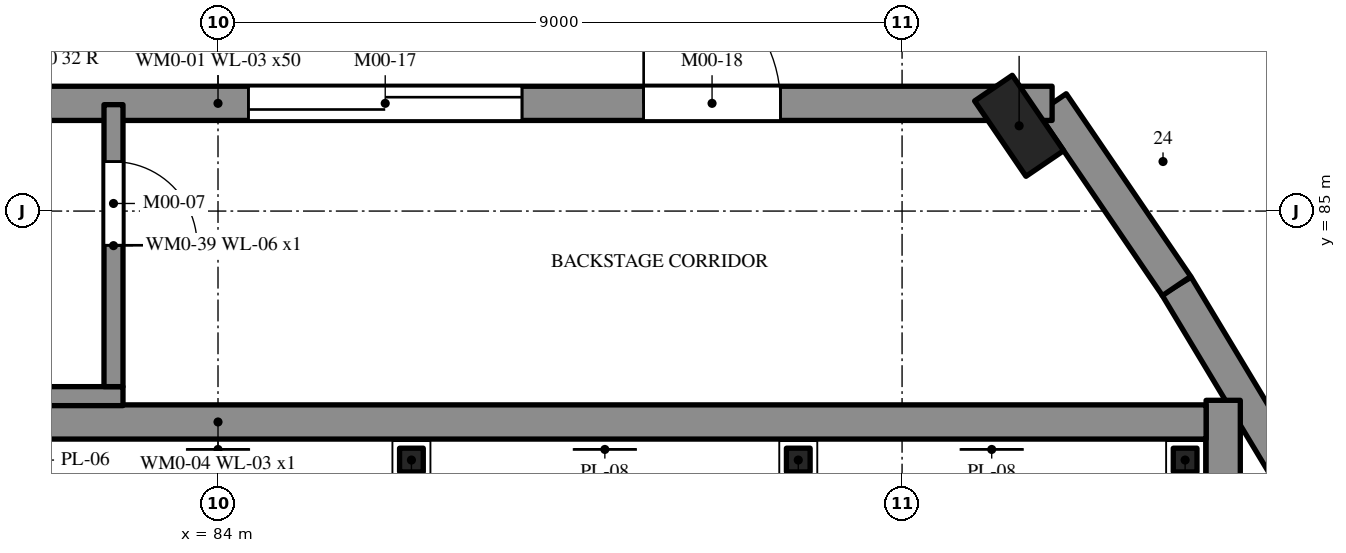
"""IFC4 building model, lengths in metres.
Left out: names, types, materials, properties, quantities, classifications, styles, units other than length and angle.
Written with IfcOpenShell. Run it as: python <this file> out.ifc"""

import sys

from ifc_helpers import new_model, si_unit, direction, frame, frame_2d, origin, origin_2d, place, context, subcontext, project, spatial, rectangle, i_section, extrude, element, fill, save


model = new_model("IFC4")
c1 = context("Model", 3, precision=1e-05, world=origin(), true_north=direction((0.0, 1.0)))
c2 = subcontext(c1, "Body", "Model", "MODEL_VIEW")
j1 = project(units=[si_unit("LENGTHUNIT", "METRE"), si_unit("PLANEANGLEUNIT", "RADIAN")], contexts=[c1])
p1 = place(None, origin())
s1 = spatial("IfcSite", under=j1, at=p1, CompositionType="ELEMENT")
p2 = place(p1, origin())
s2 = spatial("IfcBuilding", under=s1, at=p2, CompositionType="ELEMENT")
p3 = place(p2, origin())
s3 = spatial("IfcBuildingStorey", under=s2, at=p3, CompositionType="ELEMENT", Elevation=0.0)
p4 = place(p3, frame((98.169, 81.425, 0.0), z_axis=(0.0, 0.0, 1.0), x_axis=(-0.515636119523, 0.856807675177, 0.0)))
e1 = element("IfcWall", 1, at=p4, inside=s3, PredefinedType="SOLIDWALL", context=c2, shape_type="SweptSolid", body=[
    extrude(rectangle(XDim=3.021, YDim=0.45, at=frame_2d((1.511, 0.0))), origin(), (0.0, 0.0, 1.0), 5.4),
])
p5 = place(p3, frame((96.611, 84.014, 0.0), z_axis=(0.0, 0.0, 1.0), x_axis=(-0.5629642644, 0.826481238147, 0.0)))
e2 = element("IfcWall", 2, at=p5, inside=s3, PredefinedType="SOLIDWALL", context=c2, shape_type="SweptSolid", body=[
    extrude(rectangle(XDim=2.908, YDim=0.45, at=frame_2d((1.454, 0.0))), origin(), (0.0, 0.0, 1.0), 5.4),
])
p6 = place(p3, frame((94.974, 86.417, 0.0), z_axis=(0.0, 0.0, 1.0), x_axis=(-1.0, 0.0, 0.0)))
e3 = element("IfcWall", 3, at=p6, inside=s3, PredefinedType="SOLIDWALL", context=c2, shape_type="SweptSolid", body=[
    extrude(rectangle(XDim=21.948, YDim=0.45, at=frame_2d((10.974, 0.0))), origin(), (0.0, 0.0, 1.0), 5.4),
])
p7 = place(p6, frame((6.974, 0.0, 0.0)))
e4 = element("IfcOpeningElement", 4, at=p7, cuts=e3, PredefinedType="OPENING", context=c2, shape_type="SweptSolid", body=[
    extrude(rectangle(XDim=3.6, YDim=4.5, at=frame_2d((1.8, 2.25))), frame((0.0, 0.235, 0.0), z_axis=(0.0, -1.0, 0.0), x_axis=(1.0, 0.0, 0.0)), (0.0, 0.0, 1.0), 0.47),
])
p8 = place(p6, frame((3.574, 0.0, 0.0)))
e5 = element("IfcOpeningElement", 5, at=p8, cuts=e3, PredefinedType="OPENING", context=c2, shape_type="SweptSolid", body=[
    extrude(rectangle(XDim=1.8, YDim=3.0, at=frame_2d((0.9, 1.5))), frame((0.0, 0.235, 0.0), z_axis=(0.0, -1.0, 0.0), x_axis=(1.0, 0.0, 0.0)), (0.0, 0.0, 1.0), 0.47),
])
p9 = place(p3, frame((97.225, 55.4, 0.0), z_axis=(0.0, 0.0, 1.0), x_axis=(0.0, 1.0, 0.0)))
e6 = element("IfcWall", 6, at=p9, inside=s3, PredefinedType="SOLIDWALL", context=c2, shape_type="SweptSolid", body=[
    extrude(rectangle(XDim=27.11, YDim=0.45, at=frame_2d((13.555, 0.0))), origin(), (0.0, 0.0, 1.0), 5.4),
])
p10 = place(p9, frame((21.95, 0.0, 0.0)))
e7 = element("IfcOpeningElement", 7, at=p10, cuts=e6, PredefinedType="OPENING", context=c2, shape_type="SweptSolid", body=[
    extrude(rectangle(XDim=1.3, YDim=2.1, at=frame_2d((0.65, 1.05))), frame((0.0, 0.235, 0.0), z_axis=(0.0, -1.0, 0.0), x_axis=(1.0, 0.0, 0.0)), (0.0, 0.0, 1.0), 0.47),
])
p11 = place(p3, frame((71.0, 82.225, 0.0), z_axis=(0.0, 0.0, 1.0), x_axis=(1.0, 0.0, 0.0)))
e8 = element("IfcWall", 8, at=p11, inside=s3, PredefinedType="SOLIDWALL", context=c2, shape_type="SweptSolid", body=[
    extrude(rectangle(XDim=26.0, YDim=0.45, at=frame_2d((13.0, 0.0))), origin(), (0.0, 0.0, 1.0), 5.4),
])
p12 = place(p3, frame((94.54, 86.122, 0.0), z_axis=(0.0, 0.0, 1.0), x_axis=(-0.562978035902, 0.82647185741, 0.0)))
e9 = element("IfcColumn", 9, at=p12, inside=s3, PredefinedType="PILASTER", context=c2, shape_type="SweptSolid", body=[
    extrude(rectangle(XDim=1.2, YDim=0.6, at=origin_2d()), origin(), (0.0, 0.0, 1.0), 5.4),
])
p13 = place(p3, frame((74.55, 82.565, 0.0), z_axis=(0.0, 0.0, 1.0), x_axis=(1.0, 0.0, 0.0)))
e10 = element("IfcWall", 10, at=p13, inside=s3, PredefinedType="SHEAR", context=c2, shape_type="SweptSolid", body=[
    extrude(rectangle(XDim=8.2, YDim=0.25, at=frame_2d((4.1, 0.0))), origin(), (0.0, 0.0, 1.0), 5.4),
])
p14 = place(p3, frame((82.625, 86.4, 0.0), z_axis=(0.0, 0.0, 1.0), x_axis=(0.0, -1.0, 0.0)))
e11 = element("IfcWall", 11, at=p14, inside=s3, PredefinedType="SHEAR", context=c2, shape_type="SweptSolid", body=[
    extrude(rectangle(XDim=3.71, YDim=0.25, at=frame_2d((1.855, 0.0))), origin(), (0.0, 0.0, 1.0), 5.4),
])
p15 = place(p14, frame((0.75, 0.0, 0.0)))
e12 = element("IfcOpeningElement", 12, at=p15, cuts=e11, PredefinedType="OPENING", context=c2, shape_type="SweptSolid", body=[
    extrude(rectangle(XDim=1.1, YDim=2.1, at=frame_2d((0.55, 1.05))), frame((0.0, 0.135, 0.0), z_axis=(0.0, -1.0, 0.0), x_axis=(1.0, 0.0, 0.0)), (0.0, 0.0, 1.0), 0.27),
])
for number, where, z_axis, x_axis in (
    (13, (86.545, 81.724, 0.0), (0.0, 0.0, 1.0), (1.0, 0.0, 0.0)),
    (14, (91.635, 81.724, 0.0), (0.0, 0.0, 1.0), (1.0, 0.0, 0.0)),
    (15, (96.724, 81.724, 0.0), (0.0, 0.0, 1.0), (1.0, 0.0, 0.0)),
):
    element("IfcColumn", number, at=place(p3, frame(where, z_axis=z_axis, x_axis=x_axis)), inside=s3, PredefinedType="COLUMN", context=c2, shape_type="SweptSolid", body=[
        extrude(i_section(OverallWidth=0.312, OverallDepth=0.312, WebThickness=0.017, FlangeThickness=0.017, FilletRadius=0.016, at=origin_2d()), origin(), (0.0, 0.0, 1.0), 5.4),
    ])
p16 = place(p15, origin())
e16 = element("IfcDoor", 16, at=p16, inside=s3, OperationType="SINGLE_SWING_RIGHT", PredefinedType="DOOR", context=c2, shape_type="SweptSolid", body=[
    extrude(rectangle(XDim=1.1, YDim=2.1, at=frame_2d((0.55, 1.05))), frame((0.0, 0.025, 0.0), z_axis=(0.0, -1.0, 0.0), x_axis=(1.0, 0.0, 0.0)), (0.0, 0.0, 1.0), 0.05),
])
fill(e12, e16)
p17 = place(p7, origin())
e17 = element("IfcDoor", 17, at=p17, inside=s3, OperationType="ROLLINGUP", PredefinedType="DOOR", context=c2, shape_type="SweptSolid", body=[
    extrude(rectangle(XDim=3.6, YDim=4.5, at=frame_2d((1.8, 2.25))), frame((0.0, 0.025, 0.0), z_axis=(0.0, -1.0, 0.0), x_axis=(1.0, 0.0, 0.0)), (0.0, 0.0, 1.0), 0.05),
])
fill(e4, e17)
p18 = place(p8, frame((1.8, 0.0, 0.0), z_axis=(0.0, 0.0, 1.0), x_axis=(-1.0, 0.0, 0.0)))
e18 = element("IfcDoor", 18, at=p18, inside=s3, OperationType="SINGLE_SWING_LEFT", PredefinedType="DOOR", context=c2, shape_type="SweptSolid", body=[
    extrude(rectangle(XDim=1.8, YDim=3.0, at=frame_2d((0.9, 1.5))), frame((0.0, 0.025, 0.0), z_axis=(0.0, -1.0, 0.0), x_axis=(1.0, 0.0, 0.0)), (0.0, 0.0, 1.0), 0.05),
])
fill(e5, e18)
save(model, sys.argv[1])
